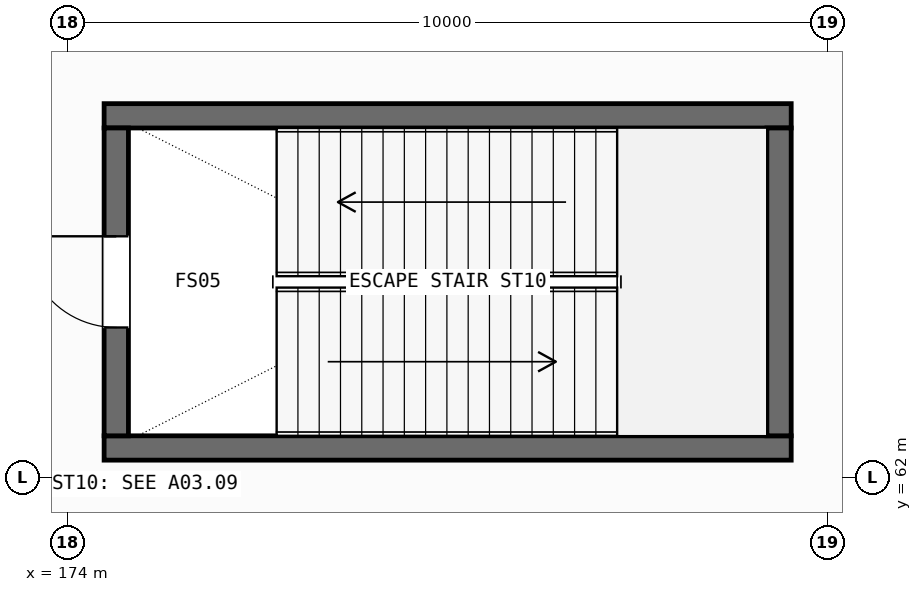
"""IFC4 building model, lengths in metres.
Left out: names, types, materials, properties, quantities, classifications, styles, units other than length and angle.
Written with IfcOpenShell. Run it as: python <this file> out.ifc"""

import sys

from ifc_helpers import new_model, si_unit, direction, frame, frame_2d, origin, place, context, subcontext, project, spatial, rectangle, extrude, element, fill, save


model = new_model("IFC4")
c1 = context("Model", 3, precision=1e-05, world=origin(), true_north=direction((0.0, 1.0)))
c2 = subcontext(c1, "Body", "Model", "MODEL_VIEW")
j1 = project(units=[si_unit("LENGTHUNIT", "METRE"), si_unit("PLANEANGLEUNIT", "RADIAN")], contexts=[c1])
p1 = place(None, origin())
s1 = spatial("IfcSite", under=j1, at=p1, CompositionType="ELEMENT")
p2 = place(p1, origin())
s2 = spatial("IfcBuilding", under=s1, at=p2, CompositionType="ELEMENT")
p3 = place(p2, origin())
s3 = spatial("IfcBuildingStorey", under=s2, at=p3, CompositionType="ELEMENT", Elevation=0.0)
for number, where, z_axis, x_axis in (
    (1, (174.48, 62.39, 0.0), (0.0, 0.0, 1.0), (1.0, 0.0, 0.0)),
    (2, (174.48, 66.76, 0.0), (0.0, 0.0, 1.0), (1.0, 0.0, 0.0)),
):
    element("IfcWall", number, at=place(p3, frame(where, z_axis=z_axis, x_axis=x_axis)), inside=s3, PredefinedType="SHEAR", context=c2, shape_type="SweptSolid", body=[
        extrude(rectangle(XDim=9.04, YDim=0.32, at=frame_2d((4.52, 0.0))), origin(), (0.0, 0.0, 1.0), 6.0),
    ])
p4 = place(p3, frame((174.64, 62.55, 0.0), z_axis=(0.0, 0.0, 1.0), x_axis=(0.0, 1.0, 0.0)))
e3 = element("IfcWall", 3, at=p4, inside=s3, PredefinedType="SHEAR", context=c2, shape_type="SweptSolid", body=[
    extrude(rectangle(XDim=4.05, YDim=0.32, at=frame_2d((2.025, 0.0))), origin(), (0.0, 0.0, 1.0), 6.0),
])
p5 = place(p4, frame((1.425, 0.0, 0.0)))
e4 = element("IfcOpeningElement", 4, at=p5, cuts=e3, PredefinedType="OPENING", context=c2, shape_type="SweptSolid", body=[
    extrude(rectangle(XDim=1.2, YDim=2.2, at=frame_2d((0.6, 1.1))), frame((0.0, 0.17, 0.0), z_axis=(0.0, -1.0, 0.0), x_axis=(1.0, 0.0, 0.0)), (0.0, 0.0, 1.0), 0.34),
])
p6 = place(p3, frame((183.36, 62.55, 0.0), z_axis=(0.0, 0.0, 1.0), x_axis=(0.0, 1.0, 0.0)))
e5 = element("IfcWall", 5, at=p6, inside=s3, PredefinedType="SHEAR", context=c2, shape_type="SweptSolid", body=[
    extrude(rectangle(XDim=4.05, YDim=0.32, at=frame_2d((2.025, 0.0))), origin(), (0.0, 0.0, 1.0), 6.0),
])
p7 = place(p5, origin())
e6 = element("IfcDoor", 6, at=p7, inside=s3, OperationType="SINGLE_SWING_RIGHT", PredefinedType="DOOR", context=c2, shape_type="SweptSolid", body=[
    extrude(rectangle(XDim=1.2, YDim=2.2, at=frame_2d((0.6, 1.1))), frame((0.0, 0.025, 0.0), z_axis=(0.0, -1.0, 0.0), x_axis=(1.0, 0.0, 0.0)), (0.0, 0.0, 1.0), 0.05),
])
fill(e4, e6)
save(model, sys.argv[1])
